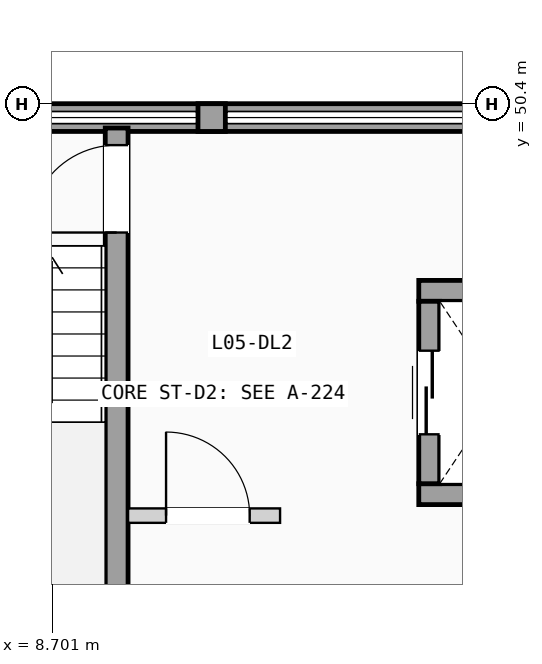
"""IFC4 building model, lengths in metres.
Left out: names, types, materials, properties, quantities, classifications, styles, units other than length and angle.
Written with IfcOpenShell. Run it as: python <this file> out.ifc"""

import sys

from ifc_helpers import new_model, si_unit, direction, frame, frame_2d, origin, place, context, subcontext, project, spatial, rectangle, extrude, element, fill, save


model = new_model("IFC4")
c1 = context("Model", 3, precision=1e-05, world=origin(), true_north=direction((0.0, 1.0)))
c2 = subcontext(c1, "Body", "Model", "MODEL_VIEW")
j1 = project(units=[si_unit("LENGTHUNIT", "METRE"), si_unit("PLANEANGLEUNIT", "RADIAN")], contexts=[c1])
p1 = place(None, origin())
s1 = spatial("IfcSite", under=j1, at=p1, CompositionType="ELEMENT")
p2 = place(p1, origin())
s2 = spatial("IfcBuilding", under=s1, at=p2, CompositionType="ELEMENT")
p3 = place(p2, frame((0.0, 0.0, 18.375)))
s3 = spatial("IfcBuildingStorey", under=s2, at=p3, CompositionType="ELEMENT", Elevation=18.375)
p4 = place(p3, frame((0.0, 50.218, 0.0), z_axis=(0.0, 0.0, 1.0), x_axis=(1.0, 0.0, 0.0)))
e1 = element("IfcWall", 1, at=p4, inside=s3, PredefinedType="SOLIDWALL", context=c2, shape_type="SweptSolid", body=[
    extrude(rectangle(XDim=21.6, YDim=0.365, at=frame_2d((10.8, 0.0))), origin(), (0.0, 0.0, 1.0), 1.11),
])
p5 = place(p3, frame((10.62, 50.218, 1.11), z_axis=(0.0, 0.0, 1.0), x_axis=(1.0, 0.0, 0.0)))
e2 = element("IfcWall", 2, at=p5, inside=s3, PredefinedType="SOLIDWALL", context=c2, shape_type="SweptSolid", body=[
    extrude(rectangle(XDim=0.36, YDim=0.365, at=frame_2d((0.18, 0.0))), origin(), (0.0, 0.0, 1.0), 1.78),
])
p6 = place(p3, frame((9.55, 43.08, 0.0), z_axis=(0.0, 0.0, 1.0), x_axis=(0.0, 1.0, 0.0)))
e3 = element("IfcWall", 3, at=p6, inside=s3, PredefinedType="SHEAR", context=c2, shape_type="SweptSolid", body=[
    extrude(rectangle(XDim=7.0, YDim=0.3, at=frame_2d((3.5, 0.0))), origin(), (0.0, 0.0, 1.0), 2.89),
])
p7 = place(p6, frame((5.625, 0.0, 0.0)))
e4 = element("IfcOpeningElement", 4, at=p7, cuts=e3, PredefinedType="OPENING", context=c2, shape_type="SweptSolid", body=[
    extrude(rectangle(XDim=1.15, YDim=2.12, at=frame_2d((0.575, 1.06))), frame((0.0, 0.16, 0.0), z_axis=(0.0, -1.0, 0.0), x_axis=(1.0, 0.0, 0.0)), (0.0, 0.0, 1.0), 0.32),
])
for number, where, z_axis, x_axis in (
    (5, (13.525, 45.262, 0.0), (0.0, 0.0, 1.0), (1.0, 0.0, 0.0)),
    (6, (13.525, 47.938, 0.0), (0.0, 0.0, 1.0), (1.0, 0.0, 0.0)),
):
    element("IfcWall", number, at=place(p3, frame(where, z_axis=z_axis, x_axis=x_axis)), inside=s3, PredefinedType="SHEAR", context=c2, shape_type="SweptSolid", body=[
        extrude(rectangle(XDim=2.15, YDim=0.275, at=frame_2d((1.075, 0.0))), origin(), (0.0, 0.0, 1.0), 2.89),
    ])
p8 = place(p3, frame((13.663, 45.4, 0.0), z_axis=(0.0, 0.0, 1.0), x_axis=(0.0, 1.0, 0.0)))
e7 = element("IfcWall", 7, at=p8, inside=s3, PredefinedType="SHEAR", context=c2, shape_type="SweptSolid", body=[
    extrude(rectangle(XDim=2.4, YDim=0.275, at=frame_2d((1.2, 0.0))), origin(), (0.0, 0.0, 1.0), 2.89),
])
p9 = place(p8, frame((0.65, 0.0, 0.0)))
e8 = element("IfcOpeningElement", 8, at=p9, cuts=e7, PredefinedType="OPENING", context=c2, shape_type="SweptSolid", body=[
    extrude(rectangle(XDim=1.1, YDim=2.15, at=frame_2d((0.55, 1.075))), frame((0.0, 0.147, 0.0), z_axis=(0.0, -1.0, 0.0), x_axis=(1.0, 0.0, 0.0)), (0.0, 0.0, 1.0), 0.295),
])
p10 = place(p3, frame((9.7, 44.98, 0.0), z_axis=(0.0, 0.0, 1.0), x_axis=(1.0, 0.0, 0.0)))
e9 = element("IfcWall", 9, at=p10, inside=s3, PredefinedType="PARTITIONING", context=c2, shape_type="SweptSolid", body=[
    extrude(rectangle(XDim=2.0, YDim=0.19, at=frame_2d((1.0, 0.0))), origin(), (0.0, 0.0, 1.0), 2.87),
])
p11 = place(p10, frame((0.5, 0.0, 0.0)))
e10 = element("IfcOpeningElement", 10, at=p11, cuts=e9, PredefinedType="OPENING", context=c2, shape_type="SweptSolid", body=[
    extrude(rectangle(XDim=1.1, YDim=2.12, at=frame_2d((0.55, 1.06))), frame((0.0, 0.105, 0.0), z_axis=(0.0, -1.0, 0.0), x_axis=(1.0, 0.0, 0.0)), (0.0, 0.0, 1.0), 0.21),
])
p12 = place(p7, origin())
e11 = element("IfcDoor", 11, at=p12, inside=s3, OperationType="SINGLE_SWING_LEFT", PredefinedType="DOOR", context=c2, shape_type="SweptSolid", body=[
    extrude(rectangle(XDim=1.15, YDim=2.12, at=frame_2d((0.575, 1.06))), frame((0.0, 0.025, 0.0), z_axis=(0.0, -1.0, 0.0), x_axis=(1.0, 0.0, 0.0)), (0.0, 0.0, 1.0), 0.05),
])
fill(e4, e11)
p13 = place(p9, origin())
e12 = element("IfcDoor", 12, at=p13, inside=s3, OperationType="SLIDING_TO_LEFT", PredefinedType="DOOR", context=c2, shape_type="SweptSolid", body=[
    extrude(rectangle(XDim=1.1, YDim=2.15, at=frame_2d((0.55, 1.075))), frame((0.0, 0.025, 0.0), z_axis=(0.0, -1.0, 0.0), x_axis=(1.0, 0.0, 0.0)), (0.0, 0.0, 1.0), 0.05),
])
fill(e8, e12)
p14 = place(p11, origin())
e13 = element("IfcDoor", 13, at=p14, inside=s3, OperationType="SINGLE_SWING_LEFT", PredefinedType="DOOR", context=c2, shape_type="SweptSolid", body=[
    extrude(rectangle(XDim=1.1, YDim=2.12, at=frame_2d((0.55, 1.06))), frame((0.0, 0.025, 0.0), z_axis=(0.0, -1.0, 0.0), x_axis=(1.0, 0.0, 0.0)), (0.0, 0.0, 1.0), 0.05),
])
fill(e10, e13)
save(model, sys.argv[1])
